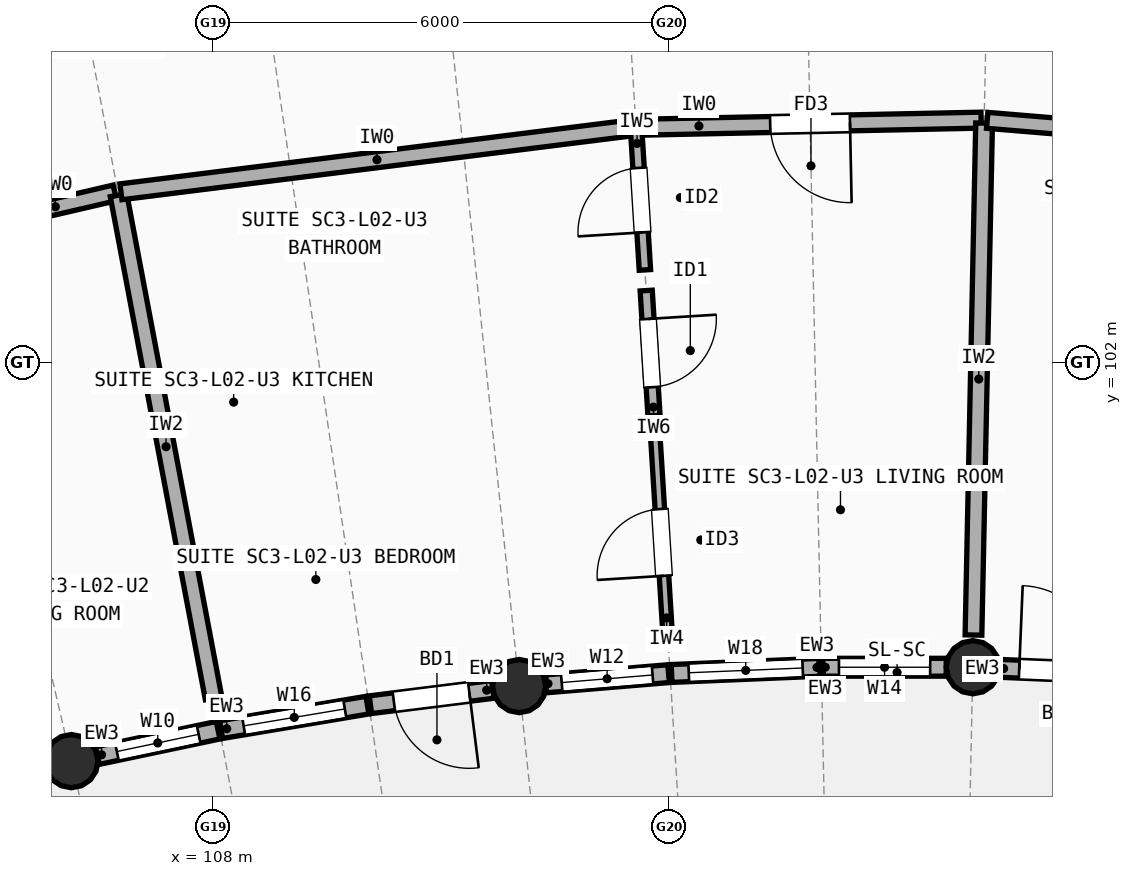
"""IFC4 building model, lengths in metres.
Left out: names, types, materials, properties, quantities, classifications, styles, units other than length and angle.
Written with IfcOpenShell. Run it as: python <this file> out.ifc"""

import sys

from ifc_helpers import new_model, si_unit, direction, frame, frame_2d, origin, origin_2d, place, context, subcontext, project, spatial, rectangle, circle, extrude, element, fill, save


model = new_model("IFC4")
c1 = context("Model", 3, precision=1e-05, world=origin(), true_north=direction((0.0, 1.0)))
c2 = subcontext(c1, "Body", "Model", "MODEL_VIEW")
j1 = project(units=[si_unit("LENGTHUNIT", "METRE"), si_unit("PLANEANGLEUNIT", "RADIAN")], contexts=[c1])
p1 = place(None, origin())
s1 = spatial("IfcSite", under=j1, at=p1, CompositionType="ELEMENT")
p2 = place(p1, origin())
s2 = spatial("IfcBuilding", under=s1, at=p2, CompositionType="ELEMENT")
p3 = place(p2, frame((0.0, 0.0, 7.7)))
s3 = spatial("IfcBuildingStorey", under=s2, at=p3, CompositionType="ELEMENT", Elevation=7.7)
for number, where, z_axis, x_axis in (
    (1, (106.136, 96.754, 0.0), (0.0, 0.0, 1.0), (1.0, 0.0, 0.0)),
    (2, (112.028, 97.742, 0.0), (0.0, 0.0, 1.0), (1.0, 0.0, 0.0)),
    (3, (117.996, 97.99, 0.0), (0.0, 0.0, 1.0), (1.0, 0.0, 0.0)),
):
    element("IfcColumn", number, at=place(p3, frame(where, z_axis=z_axis, x_axis=x_axis)), inside=s3, PredefinedType="COLUMN", context=c2, shape_type="SweptSolid", body=[
        extrude(circle(Radius=0.35, at=origin_2d()), origin(), (0.0, 0.0, 1.0), 2.948),
    ])
p4 = place(p3, frame((106.479, 96.826, 0.0), z_axis=(0.0, 0.0, 1.0), x_axis=(0.978514642092, 0.206177339229, 0.0)))
e4 = element("IfcWall", 4, at=p4, inside=s3, PredefinedType="STANDARD", context=c2, shape_type="SweptSolid", body=[
    extrude(rectangle(XDim=1.622, YDim=0.235, at=frame_2d((0.811, 0.0))), origin(), (0.0, 0.0, 1.0), 2.684),
])
p5 = place(p4, frame((0.261, 0.0, 0.85)))
e5 = element("IfcOpeningElement", 5, at=p5, cuts=e4, PredefinedType="OPENING", context=c2, shape_type="SweptSolid", body=[
    extrude(rectangle(XDim=1.1, YDim=1.45, at=frame_2d((0.55, 0.725))), frame((0.0, 0.127, 0.0), z_axis=(0.0, -1.0, 0.0), x_axis=(1.0, 0.0, 0.0)), (0.0, 0.0, 1.0), 0.255),
])
p6 = place(p3, frame((108.105, 97.168, 0.0), z_axis=(0.0, 0.0, 1.0), x_axis=(0.986241418229, 0.165311418144, 0.0)))
e6 = element("IfcWall", 6, at=p6, inside=s3, PredefinedType="STANDARD", context=c2, shape_type="SweptSolid", body=[
    extrude(rectangle(XDim=1.952, YDim=0.235, at=frame_2d((0.976, 0.0))), origin(), (0.0, 0.0, 1.0), 2.684),
])
p7 = place(p6, frame((0.301, 0.0, 0.85)))
e7 = element("IfcOpeningElement", 7, at=p7, cuts=e6, PredefinedType="OPENING", context=c2, shape_type="SweptSolid", body=[
    extrude(rectangle(XDim=1.35, YDim=1.5, at=frame_2d((0.675, 0.75))), frame((0.0, 0.127, 0.0), z_axis=(0.0, -1.0, 0.0), x_axis=(1.0, 0.0, 0.0)), (0.0, 0.0, 1.0), 0.255),
])
p8 = place(p3, frame((110.071, 97.497, 0.0), z_axis=(0.0, 0.0, 1.0), x_axis=(0.992263980046, 0.124145857376, 0.0)))
e8 = element("IfcWall", 8, at=p8, inside=s3, PredefinedType="STANDARD", context=c2, shape_type="SweptSolid", body=[
    extrude(rectangle(XDim=1.622, YDim=0.235, at=frame_2d((0.811, 0.0))), origin(), (0.0, 0.0, 1.0), 2.684),
])
p9 = place(p8, frame((0.311, 0.0, 0.0)))
e9 = element("IfcOpeningElement", 9, at=p9, cuts=e8, PredefinedType="OPENING", context=c2, shape_type="SweptSolid", body=[
    extrude(rectangle(XDim=1.0, YDim=2.15, at=frame_2d((0.5, 1.075))), frame((0.0, 0.127, 0.0), z_axis=(0.0, -1.0, 0.0), x_axis=(1.0, 0.0, 0.0)), (0.0, 0.0, 1.0), 0.255),
])
p10 = place(p3, frame((112.376, 97.771, 0.0), z_axis=(0.0, 0.0, 1.0), x_axis=(0.996557163732, 0.082908500259, 0.0)))
e10 = element("IfcWall", 10, at=p10, inside=s3, PredefinedType="STANDARD", context=c2, shape_type="SweptSolid", body=[
    extrude(rectangle(XDim=1.623, YDim=0.235, at=frame_2d((0.811, 0.0))), origin(), (0.0, 0.0, 1.0), 2.684),
])
p11 = place(p10, frame((0.211, 0.0, 0.85)))
e11 = element("IfcOpeningElement", 11, at=p11, cuts=e10, PredefinedType="OPENING", context=c2, shape_type="SweptSolid", body=[
    extrude(rectangle(XDim=1.2, YDim=1.35, at=frame_2d((0.6, 0.675))), frame((0.0, 0.127, 0.0), z_axis=(0.0, -1.0, 0.0), x_axis=(1.0, 0.0, 0.0)), (0.0, 0.0, 1.0), 0.255),
])
p12 = place(p3, frame((114.033, 97.908, 0.0), z_axis=(0.0, 0.0, 1.0), x_axis=(0.999132639597, 0.041640947307, 0.0)))
e12 = element("IfcWall", 12, at=p12, inside=s3, PredefinedType="STANDARD", context=c2, shape_type="SweptSolid", body=[
    extrude(rectangle(XDim=1.952, YDim=0.235, at=frame_2d((0.976, 0.0))), origin(), (0.0, 0.0, 1.0), 2.684),
])
p13 = place(p12, frame((0.226, 0.0, 0.85)))
e13 = element("IfcOpeningElement", 13, at=p13, cuts=e12, PredefinedType="OPENING", context=c2, shape_type="SweptSolid", body=[
    extrude(rectangle(XDim=1.5, YDim=1.4, at=frame_2d((0.75, 0.7))), frame((0.0, 0.127, 0.0), z_axis=(0.0, -1.0, 0.0), x_axis=(1.0, 0.0, 0.0)), (0.0, 0.0, 1.0), 0.255),
])
p14 = place(p3, frame((116.024, 97.99, 0.0), z_axis=(0.0, 0.0, 1.0), x_axis=(1.0, 0.0, 0.0)))
e14 = element("IfcWall", 14, at=p14, inside=s3, PredefinedType="STANDARD", context=c2, shape_type="SweptSolid", body=[
    extrude(rectangle(XDim=1.623, YDim=0.235, at=frame_2d((0.811, 0.0))), origin(), (0.0, 0.0, 1.0), 2.684),
])
p15 = place(p14, frame((0.211, 0.0, 0.85)))
e15 = element("IfcOpeningElement", 15, at=p15, cuts=e14, PredefinedType="OPENING", context=c2, shape_type="SweptSolid", body=[
    extrude(rectangle(XDim=1.2, YDim=1.5, at=frame_2d((0.6, 0.75))), frame((0.0, 0.127, 0.0), z_axis=(0.0, -1.0, 0.0), x_axis=(1.0, 0.0, 0.0)), (0.0, 0.0, 1.0), 0.255),
])
p16 = place(p3, frame((118.346, 97.975, 0.0), z_axis=(0.0, 0.0, 1.0), x_axis=(0.999136981031, -0.041536648104, 0.0)))
e16 = element("IfcWall", 16, at=p16, inside=s3, PredefinedType="STANDARD", context=c2, shape_type="SweptSolid", body=[
    extrude(rectangle(XDim=1.622, YDim=0.235, at=frame_2d((0.811, 0.0))), origin(), (0.0, 0.0, 1.0), 2.684),
])
p17 = place(p16, frame((0.261, 0.0, 0.0)))
e17 = element("IfcOpeningElement", 17, at=p17, cuts=e16, PredefinedType="OPENING", context=c2, shape_type="SweptSolid", body=[
    extrude(rectangle(XDim=1.1, YDim=2.15, at=frame_2d((0.55, 1.075))), frame((0.0, 0.127, 0.0), z_axis=(0.0, -1.0, 0.0), x_axis=(1.0, 0.0, 0.0)), (0.0, 0.0, 1.0), 0.255),
])
p18 = place(p3, frame((102.325, 103.212, 0.0), z_axis=(0.0, 0.0, 1.0), x_axis=(0.974052809246, 0.226320844821, 0.0)))
e18 = element("IfcWall", 18, at=p18, inside=s3, PredefinedType="SOLIDWALL", context=c2, shape_type="SweptSolid", body=[
    extrude(rectangle(XDim=4.501, YDim=0.21, at=frame_2d((2.251, 0.0))), origin(), (0.0, 0.0, 1.0), 2.742),
])
p19 = place(p18, frame((1.761, 0.0, 0.0)))
e19 = element("IfcOpeningElement", 19, at=p19, cuts=e18, PredefinedType="OPENING", context=c2, shape_type="SweptSolid", body=[
    extrude(rectangle(XDim=0.98, YDim=2.15, at=frame_2d((0.49, 1.075))), frame((0.0, 0.115, 0.0), z_axis=(0.0, -1.0, 0.0), x_axis=(1.0, 0.0, 0.0)), (0.0, 0.0, 1.0), 0.23),
])
p20 = place(p3, frame((108.007, 97.582, 0.0), z_axis=(0.0, 0.0, 1.0), x_axis=(-0.185712925624, 0.982604045003, 0.0)))
e20 = element("IfcWall", 20, at=p20, inside=s3, PredefinedType="SOLIDWALL", context=c2, shape_type="SweptSolid", body=[
    extrude(rectangle(XDim=6.736, YDim=0.22, at=frame_2d((3.368, 0.0))), origin(), (0.0, 0.0, 1.0), 2.762),
])
p21 = place(p3, frame((106.788, 104.245, 0.0), z_axis=(0.0, 0.0, 1.0), x_axis=(0.992257394877, 0.124198479504, 0.0)))
e21 = element("IfcWall", 21, at=p21, inside=s3, PredefinedType="SOLIDWALL", context=c2, shape_type="SweptSolid", body=[
    extrude(rectangle(XDim=6.79, YDim=0.21, at=frame_2d((3.395, 0.0))), origin(), (0.0, 0.0, 1.0), 2.722),
])
p22 = place(p3, frame((113.605, 105.094, 0.0), z_axis=(0.0, 0.0, 1.0), x_axis=(0.999785356511, 0.020718129879, 0.0)))
e22 = element("IfcWall", 22, at=p22, inside=s3, PredefinedType="SOLIDWALL", context=c2, shape_type="SweptSolid", body=[
    extrude(rectangle(XDim=4.501, YDim=0.21, at=frame_2d((2.251, 0.0))), origin(), (0.0, 0.0, 1.0), 2.722),
])
p23 = place(p22, frame((1.726, 0.0, 0.0)))
e23 = element("IfcOpeningElement", 23, at=p23, cuts=e22, PredefinedType="OPENING", context=c2, shape_type="SweptSolid", body=[
    extrude(rectangle(XDim=1.05, YDim=2.15, at=frame_2d((0.525, 1.075))), frame((0.0, 0.115, 0.0), z_axis=(0.0, -1.0, 0.0), x_axis=(1.0, 0.0, 0.0)), (0.0, 0.0, 1.0), 0.23),
])
p24 = place(p3, frame((113.993, 98.234, 0.0), z_axis=(0.0, 0.0, 1.0), x_axis=(-0.062253438174, 0.998060373643, 0.0)))
e24 = element("IfcWall", 24, at=p24, inside=s3, PredefinedType="PARTITIONING", context=c2, shape_type="SweptSolid", body=[
    extrude(rectangle(XDim=2.8, YDim=0.125, at=frame_2d((1.4, 0.0))), origin(), (0.0, 0.0, 1.0), 2.762),
])
p25 = place(p24, frame((0.96, 0.0, 0.0)))
e25 = element("IfcOpeningElement", 25, at=p25, cuts=e24, PredefinedType="OPENING", context=c2, shape_type="SweptSolid", body=[
    extrude(rectangle(XDim=0.88, YDim=2.1, at=frame_2d((0.44, 1.05))), frame((0.0, 0.073, 0.0), z_axis=(0.0, -1.0, 0.0), x_axis=(1.0, 0.0, 0.0)), (0.0, 0.0, 1.0), 0.145),
])
p26 = place(p3, frame((113.802, 101.3, 0.0), z_axis=(0.0, 0.0, 1.0), x_axis=(-0.062064740375, 0.998072125651, 0.0)))
e26 = element("IfcWall", 26, at=p26, inside=s3, PredefinedType="PLUMBINGWALL", context=c2, shape_type="SweptSolid", body=[
    extrude(rectangle(XDim=1.648, YDim=0.16, at=frame_2d((0.824, 0.0))), origin(), (0.0, 0.0, 1.0), 2.762),
])
p27 = place(p26, frame((0.374, 0.0, 0.0)))
e27 = element("IfcOpeningElement", 27, at=p27, cuts=e26, PredefinedType="OPENING", context=c2, shape_type="SweptSolid", body=[
    extrude(rectangle(XDim=0.9, YDim=2.1, at=frame_2d((0.45, 1.05))), frame((0.0, 0.09, 0.0), z_axis=(0.0, -1.0, 0.0), x_axis=(1.0, 0.0, 0.0)), (0.0, 0.0, 1.0), 0.18),
])
p28 = place(p3, frame((113.682, 103.217, 0.0), z_axis=(0.0, 0.0, 1.0), x_axis=(-0.062229594869, 0.998061860569, 0.0)))
e28 = element("IfcWall", 28, at=p28, inside=s3, PredefinedType="PARTITIONING", context=c2, shape_type="SweptSolid", body=[
    extrude(rectangle(XDim=1.84, YDim=0.15, at=frame_2d((0.92, 0.0))), origin(), (0.0, 0.0, 1.0), 2.762),
])
p29 = place(p28, frame((0.495, 0.0, 0.0)))
e29 = element("IfcOpeningElement", 29, at=p29, cuts=e28, PredefinedType="OPENING", context=c2, shape_type="SweptSolid", body=[
    extrude(rectangle(XDim=0.85, YDim=2.1, at=frame_2d((0.425, 1.05))), frame((0.0, 0.085, 0.0), z_axis=(0.0, -1.0, 0.0), x_axis=(1.0, 0.0, 0.0)), (0.0, 0.0, 1.0), 0.17),
])
p30 = place(p3, frame((118.005, 98.414, 0.0), z_axis=(0.0, 0.0, 1.0), x_axis=(0.020767678819, 0.999784328501, 0.0)))
e30 = element("IfcWall", 30, at=p30, inside=s3, PredefinedType="SOLIDWALL", context=c2, shape_type="SweptSolid", body=[
    extrude(rectangle(XDim=6.736, YDim=0.22, at=frame_2d((3.368, 0.0))), origin(), (0.0, 0.0, 1.0), 2.742),
])
p31 = place(p3, frame((118.186, 105.185, 0.0), z_axis=(0.0, 0.0, 1.0), x_axis=(0.996556165996, -0.082920492126, 0.0)))
e31 = element("IfcWall", 31, at=p31, inside=s3, PredefinedType="SOLIDWALL", context=c2, shape_type="SweptSolid", body=[
    extrude(rectangle(XDim=6.79, YDim=0.21, at=frame_2d((3.395, 0.0))), origin(), (0.0, 0.0, 1.0), 2.722),
])
p32 = place(p5, origin())
e32 = element("IfcWindow", 32, at=p32, inside=s3, PartitioningType="SINGLE_PANEL", PredefinedType="WINDOW", context=c2, shape_type="SweptSolid", body=[
    extrude(rectangle(XDim=1.1, YDim=1.45, at=frame_2d((0.55, 0.725))), frame((0.0, 0.03, 0.0), z_axis=(0.0, -1.0, 0.0), x_axis=(1.0, 0.0, 0.0)), (0.0, 0.0, 1.0), 0.06),
])
fill(e5, e32)
p33 = place(p7, origin())
e33 = element("IfcWindow", 33, at=p33, inside=s3, PartitioningType="SINGLE_PANEL", PredefinedType="WINDOW", context=c2, shape_type="SweptSolid", body=[
    extrude(rectangle(XDim=1.35, YDim=1.5, at=frame_2d((0.675, 0.75))), frame((0.0, 0.03, 0.0), z_axis=(0.0, -1.0, 0.0), x_axis=(1.0, 0.0, 0.0)), (0.0, 0.0, 1.0), 0.06),
])
fill(e7, e33)
p34 = place(p9, frame((1.0, 0.0, 0.0), z_axis=(0.0, 0.0, 1.0), x_axis=(-1.0, 0.0, 0.0)))
e34 = element("IfcDoor", 34, at=p34, inside=s3, OperationType="SINGLE_SWING_RIGHT", PredefinedType="DOOR", context=c2, shape_type="SweptSolid", body=[
    extrude(rectangle(XDim=1.0, YDim=2.15, at=frame_2d((0.5, 1.075))), frame((0.0, 0.025, 0.0), z_axis=(0.0, -1.0, 0.0), x_axis=(1.0, 0.0, 0.0)), (0.0, 0.0, 1.0), 0.05),
])
fill(e9, e34)
p35 = place(p11, origin())
e35 = element("IfcWindow", 35, at=p35, inside=s3, PartitioningType="SINGLE_PANEL", PredefinedType="WINDOW", context=c2, shape_type="SweptSolid", body=[
    extrude(rectangle(XDim=1.2, YDim=1.35, at=frame_2d((0.6, 0.675))), frame((0.0, 0.03, 0.0), z_axis=(0.0, -1.0, 0.0), x_axis=(1.0, 0.0, 0.0)), (0.0, 0.0, 1.0), 0.06),
])
fill(e11, e35)
p36 = place(p13, origin())
e36 = element("IfcWindow", 36, at=p36, inside=s3, PartitioningType="SINGLE_PANEL", PredefinedType="WINDOW", context=c2, shape_type="SweptSolid", body=[
    extrude(rectangle(XDim=1.5, YDim=1.4, at=frame_2d((0.75, 0.7))), frame((0.0, 0.03, 0.0), z_axis=(0.0, -1.0, 0.0), x_axis=(1.0, 0.0, 0.0)), (0.0, 0.0, 1.0), 0.06),
])
fill(e13, e36)
p37 = place(p15, origin())
e37 = element("IfcWindow", 37, at=p37, inside=s3, PartitioningType="SINGLE_PANEL", PredefinedType="WINDOW", context=c2, shape_type="SweptSolid", body=[
    extrude(rectangle(XDim=1.2, YDim=1.5, at=frame_2d((0.6, 0.75))), frame((0.0, 0.03, 0.0), z_axis=(0.0, -1.0, 0.0), x_axis=(1.0, 0.0, 0.0)), (0.0, 0.0, 1.0), 0.06),
])
fill(e15, e37)
p38 = place(p17, frame((1.1, 0.0, 0.0), z_axis=(0.0, 0.0, 1.0), x_axis=(-1.0, 0.0, 0.0)))
e38 = element("IfcDoor", 38, at=p38, inside=s3, OperationType="SINGLE_SWING_LEFT", PredefinedType="DOOR", context=c2, shape_type="SweptSolid", body=[
    extrude(rectangle(XDim=1.1, YDim=2.15, at=frame_2d((0.55, 1.075))), frame((0.0, 0.025, 0.0), z_axis=(0.0, -1.0, 0.0), x_axis=(1.0, 0.0, 0.0)), (0.0, 0.0, 1.0), 0.05),
])
fill(e17, e38)
p39 = place(p23, origin())
e39 = element("IfcDoor", 39, at=p39, inside=s3, OperationType="SINGLE_SWING_RIGHT", PredefinedType="DOOR", context=c2, shape_type="SweptSolid", body=[
    extrude(rectangle(XDim=1.05, YDim=2.15, at=frame_2d((0.525, 1.075))), frame((0.0, 0.025, 0.0), z_axis=(0.0, -1.0, 0.0), x_axis=(1.0, 0.0, 0.0)), (0.0, 0.0, 1.0), 0.05),
])
fill(e23, e39)
p40 = place(p25, origin())
e40 = element("IfcDoor", 40, at=p40, inside=s3, OperationType="SINGLE_SWING_LEFT", PredefinedType="DOOR", context=c2, shape_type="SweptSolid", body=[
    extrude(rectangle(XDim=0.88, YDim=2.1, at=frame_2d((0.44, 1.05))), frame((0.0, 0.025, 0.0), z_axis=(0.0, -1.0, 0.0), x_axis=(1.0, 0.0, 0.0)), (0.0, 0.0, 1.0), 0.05),
])
fill(e25, e40)
p41 = place(p27, origin())
e41 = element("IfcDoor", 41, at=p41, inside=s3, OperationType="SINGLE_SWING_RIGHT", PredefinedType="DOOR", context=c2, shape_type="SweptSolid", body=[
    extrude(rectangle(XDim=0.9, YDim=2.1, at=frame_2d((0.45, 1.05))), frame((0.0, 0.025, 0.0), z_axis=(0.0, -1.0, 0.0), x_axis=(1.0, 0.0, 0.0)), (0.0, 0.0, 1.0), 0.05),
])
fill(e27, e41)
p42 = place(p29, origin())
e42 = element("IfcDoor", 42, at=p42, inside=s3, OperationType="SINGLE_SWING_LEFT", PredefinedType="DOOR", context=c2, shape_type="SweptSolid", body=[
    extrude(rectangle(XDim=0.85, YDim=2.1, at=frame_2d((0.425, 1.05))), frame((0.0, 0.025, 0.0), z_axis=(0.0, -1.0, 0.0), x_axis=(1.0, 0.0, 0.0)), (0.0, 0.0, 1.0), 0.05),
])
fill(e29, e42)
save(model, sys.argv[1])
